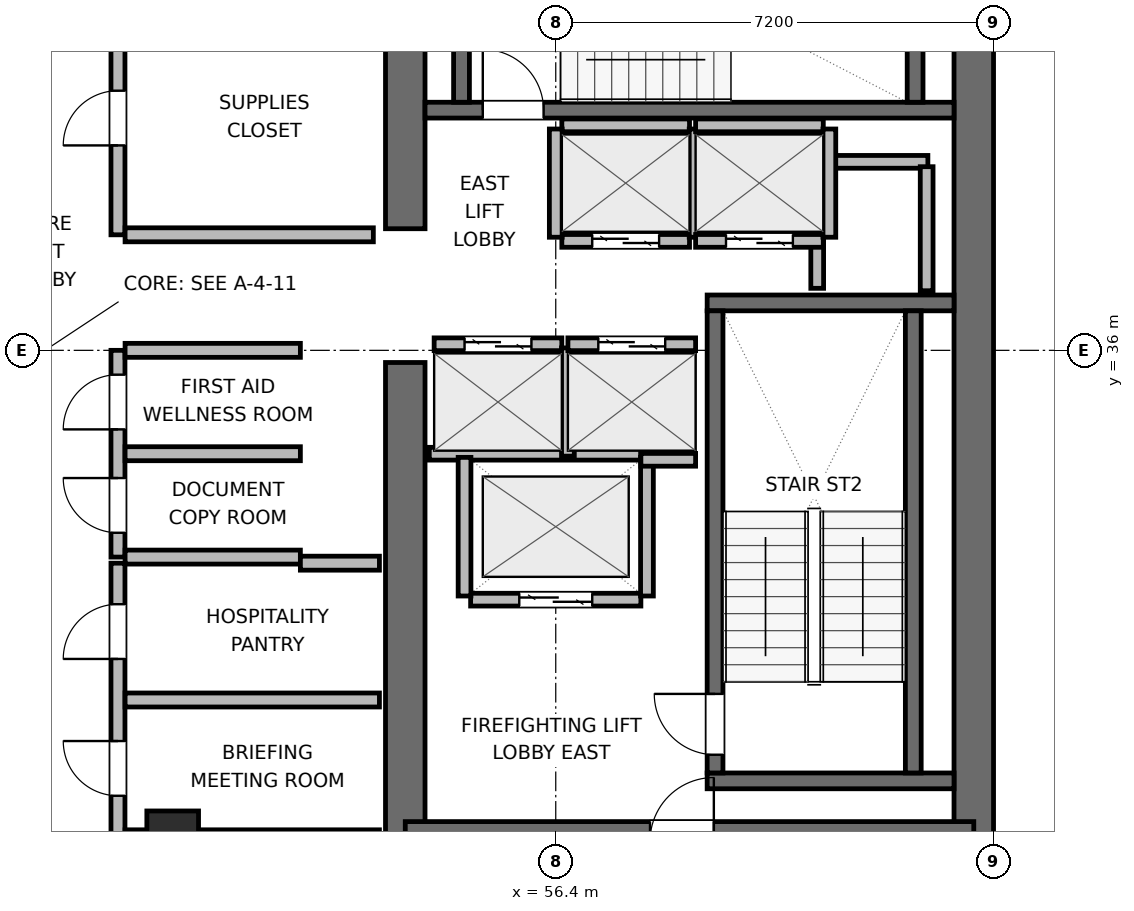
"""IFC4 building model, lengths in metres.
Left out: names, types, materials, properties, quantities, classifications, styles, units other than length and angle.
Written with IfcOpenShell. Run it as: python <this file> out.ifc"""

import sys

from ifc_helpers import new_model, si_unit, direction, frame, frame_2d, origin, origin_2d, place, context, subcontext, project, spatial, rectangle, extrude, element, fill, save


model = new_model("IFC4")
c1 = context("Model", 3, precision=1e-05, world=origin(), true_north=direction((0.0, 1.0)))
c2 = subcontext(c1, "Body", "Model", "MODEL_VIEW")
j1 = project(units=[si_unit("LENGTHUNIT", "METRE"), si_unit("PLANEANGLEUNIT", "RADIAN")], contexts=[c1])
p1 = place(None, origin())
s1 = spatial("IfcSite", under=j1, at=p1, CompositionType="ELEMENT")
p2 = place(p1, origin())
s2 = spatial("IfcBuilding", under=s1, at=p2, CompositionType="ELEMENT")
p3 = place(p2, frame((0.0, 0.0, 255.0)))
s3 = spatial("IfcBuildingStorey", under=s2, at=p3, CompositionType="ELEMENT", Elevation=255.0)
p4 = place(p3, frame((53.925, 27.925, 0.0), z_axis=(0.0, 0.0, 1.0), x_axis=(0.0, 1.0, 0.0)))
e1 = element("IfcWall", 1, at=p4, inside=s3, PredefinedType="SHEAR", context=c2, shape_type="SweptSolid", body=[
    extrude(rectangle(XDim=7.875, YDim=0.65, at=frame_2d((3.938, 0.0))), origin(), (0.0, 0.0, 1.0), 3.9),
])
p5 = place(p3, frame((53.925, 38.0, 0.0), z_axis=(0.0, 0.0, 1.0), x_axis=(0.0, 1.0, 0.0)))
e2 = element("IfcWall", 2, at=p5, inside=s3, PredefinedType="SHEAR", context=c2, shape_type="SweptSolid", body=[
    extrude(rectangle(XDim=6.075, YDim=0.65, at=frame_2d((3.038, 0.0))), origin(), (0.0, 0.0, 1.0), 3.9),
])
p6 = place(p3, frame((63.275, 27.6, 0.0), z_axis=(0.0, 0.0, 1.0), x_axis=(0.0, 1.0, 0.0)))
e3 = element("IfcWall", 3, at=p6, inside=s3, PredefinedType="SHEAR", context=c2, shape_type="SweptSolid", body=[
    extrude(rectangle(XDim=16.8, YDim=0.65, at=frame_2d((8.4, 0.0))), origin(), (0.0, 0.0, 1.0), 3.9),
])
p7 = place(p3, frame((53.925, 27.925, 0.0), z_axis=(0.0, 0.0, 1.0), x_axis=(1.0, 0.0, 0.0)))
e4 = element("IfcWall", 4, at=p7, inside=s3, PredefinedType="SHEAR", context=c2, shape_type="SweptSolid", body=[
    extrude(rectangle(XDim=9.35, YDim=0.65, at=frame_2d((4.675, 0.0))), origin(), (0.0, 0.0, 1.0), 3.9),
])
p8 = place(p7, frame((4.025, 0.0, 0.0)))
e5 = element("IfcOpeningElement", 5, at=p8, cuts=e4, PredefinedType="OPENING", context=c2, shape_type="SweptSolid", body=[
    extrude(rectangle(XDim=1.05, YDim=2.04, at=frame_2d((0.525, 1.02))), frame((0.0, 0.335, 0.0), z_axis=(0.0, -1.0, 0.0), x_axis=(1.0, 0.0, 0.0)), (0.0, 0.0, 1.0), 0.67),
])
for number, where, z_axis, x_axis in (
    (6, (58.89, 28.92, 0.0), (0.0, 0.0, 1.0), (1.0, 0.0, 0.0)),
    (7, (58.89, 36.78, 0.0), (0.0, 0.0, 1.0), (1.0, 0.0, 0.0)),
):
    element("IfcWall", number, at=place(p3, frame(where, z_axis=z_axis, x_axis=x_axis)), inside=s3, PredefinedType="SHEAR", context=c2, shape_type="SweptSolid", body=[
        extrude(rectangle(XDim=4.06, YDim=0.26, at=frame_2d((2.03, 0.0))), origin(), (0.0, 0.0, 1.0), 3.9),
    ])
p9 = place(p3, frame((59.02, 29.05, 0.0), z_axis=(0.0, 0.0, 1.0), x_axis=(0.0, 1.0, 0.0)))
e8 = element("IfcWall", 8, at=p9, inside=s3, PredefinedType="SHEAR", context=c2, shape_type="SweptSolid", body=[
    extrude(rectangle(XDim=7.6, YDim=0.26, at=frame_2d((3.8, 0.0))), origin(), (0.0, 0.0, 1.0), 3.9),
])
p10 = place(p9, frame((0.3, 0.0, 0.0)))
e9 = element("IfcOpeningElement", 9, at=p10, cuts=e8, PredefinedType="OPENING", context=c2, shape_type="SweptSolid", body=[
    extrude(rectangle(XDim=1.0, YDim=2.04, at=frame_2d((0.5, 1.02))), frame((0.0, 0.14, 0.0), z_axis=(0.0, -1.0, 0.0), x_axis=(1.0, 0.0, 0.0)), (0.0, 0.0, 1.0), 0.28),
])
p11 = place(p3, frame((62.28, 29.05, 0.0), z_axis=(0.0, 0.0, 1.0), x_axis=(0.0, 1.0, 0.0)))
e10 = element("IfcWall", 10, at=p11, inside=s3, PredefinedType="SHEAR", context=c2, shape_type="SweptSolid", body=[
    extrude(rectangle(XDim=7.6, YDim=0.26, at=frame_2d((3.8, 0.0))), origin(), (0.0, 0.0, 1.0), 3.9),
])
p12 = place(p3, frame((54.25, 39.95, 0.0), z_axis=(0.0, 0.0, 1.0), x_axis=(1.0, 0.0, 0.0)))
e11 = element("IfcWall", 11, at=p12, inside=s3, PredefinedType="SHEAR", context=c2, shape_type="SweptSolid", body=[
    extrude(rectangle(XDim=8.7, YDim=0.26, at=frame_2d((4.35, 0.0))), origin(), (0.0, 0.0, 1.0), 3.9),
])
p13 = place(p12, frame((0.95, 0.0, 0.0)))
e12 = element("IfcOpeningElement", 12, at=p13, cuts=e11, PredefinedType="OPENING", context=c2, shape_type="SweptSolid", body=[
    extrude(rectangle(XDim=1.0, YDim=2.04, at=frame_2d((0.5, 1.02))), frame((0.0, 0.14, 0.0), z_axis=(0.0, -1.0, 0.0), x_axis=(1.0, 0.0, 0.0)), (0.0, 0.0, 1.0), 0.28),
])
for number, where, z_axis, x_axis in (
    (13, (54.85, 40.08, 0.0), (0.0, 0.0, 1.0), (0.0, 1.0, 0.0)),
    (14, (62.31, 40.08, 0.0), (0.0, 0.0, 1.0), (0.0, 1.0, 0.0)),
):
    element("IfcWall", number, at=place(p3, frame(where, z_axis=z_axis, x_axis=x_axis)), inside=s3, PredefinedType="SHEAR", context=c2, shape_type="SweptSolid", body=[
        extrude(rectangle(XDim=2.94, YDim=0.26, at=frame_2d((1.47, 0.0))), origin(), (0.0, 0.0, 1.0), 3.9),
    ])
p14 = place(p3, frame((50.1, 28.0, 0.0), z_axis=(0.0, 0.0, 1.0), x_axis=(1.0, 0.0, 0.0)))
e15 = element("IfcColumn", 15, at=p14, inside=s3, PredefinedType="COLUMN", context=c2, shape_type="SweptSolid", body=[
    extrude(rectangle(XDim=0.85, YDim=0.85, at=origin_2d()), origin(), (0.0, 0.0, 1.0), 3.9),
])
p15 = place(p3, frame((60.72, 39.1, 0.0), z_axis=(0.0, 0.0, 1.0), x_axis=(1.0, 0.0, 0.0)))
e16 = element("IfcWall", 16, at=p15, inside=s3, PredefinedType="PARTITIONING", context=c2, shape_type="SweptSolid", body=[
    extrude(rectangle(XDim=1.8, YDim=0.21, at=frame_2d((0.9, 0.0))), origin(), (0.0, 0.0, 1.0), 3.68),
])
p16 = place(p3, frame((60.7, 37.02, 0.0), z_axis=(0.0, 0.0, 1.0), x_axis=(0.0, 1.0, 0.0)))
e17 = element("IfcWall", 17, at=p16, inside=s3, PredefinedType="PARTITIONING", context=c2, shape_type="SweptSolid", body=[
    extrude(rectangle(XDim=1.96, YDim=0.21, at=frame_2d((0.98, 0.0))), origin(), (0.0, 0.0, 1.0), 3.68),
])
p17 = place(p3, frame((62.5, 36.98, 0.0), z_axis=(0.0, 0.0, 1.0), x_axis=(0.0, 1.0, 0.0)))
e18 = element("IfcWall", 18, at=p17, inside=s3, PredefinedType="PARTITIONING", context=c2, shape_type="SweptSolid", body=[
    extrude(rectangle(XDim=2.04, YDim=0.21, at=frame_2d((1.02, 0.0))), origin(), (0.0, 0.0, 1.0), 3.68),
])
p18 = place(p3, frame((55.0, 31.9, 0.0), z_axis=(0.0, 0.0, 1.0), x_axis=(1.0, 0.0, 0.0)))
e19 = element("IfcWall", 19, at=p18, inside=s3, PredefinedType="PARTITIONING", context=c2, shape_type="SweptSolid", body=[
    extrude(rectangle(XDim=2.8, YDim=0.21, at=frame_2d((1.4, 0.0))), origin(), (0.0, 0.0, 1.0), 3.68),
])
p19 = place(p18, frame((0.8, 0.0, 0.0)))
e20 = element("IfcOpeningElement", 20, at=p19, cuts=e19, PredefinedType="OPENING", context=c2, shape_type="SweptSolid", body=[
    extrude(rectangle(XDim=1.2, YDim=2.04, at=frame_2d((0.6, 1.02))), frame((0.0, 0.115, 0.0), z_axis=(0.0, -1.0, 0.0), x_axis=(1.0, 0.0, 0.0)), (0.0, 0.0, 1.0), 0.23),
])
p20 = place(p3, frame((54.32, 34.3, 0.0), z_axis=(0.0, 0.0, 1.0), x_axis=(1.0, 0.0, 0.0)))
e21 = element("IfcWall", 21, at=p20, inside=s3, PredefinedType="PARTITIONING", context=c2, shape_type="SweptSolid", body=[
    extrude(rectangle(XDim=3.48, YDim=0.21, at=frame_2d((1.74, 0.0))), origin(), (0.0, 0.0, 1.0), 3.68),
])
for number, where, z_axis, x_axis in (
    (22, (54.9, 31.96, 0.0), (0.0, 0.0, 1.0), (0.0, 1.0, 0.0)),
    (23, (57.9, 31.96, 0.0), (0.0, 0.0, 1.0), (0.0, 1.0, 0.0)),
):
    element("IfcWall", number, at=place(p3, frame(where, z_axis=z_axis, x_axis=x_axis)), inside=s3, PredefinedType="PARTITIONING", context=c2, shape_type="SweptSolid", body=[
        extrude(rectangle(XDim=2.28, YDim=0.21, at=frame_2d((1.14, 0.0))), origin(), (0.0, 0.0, 1.0), 3.68),
    ])
p21 = place(p3, frame((54.4, 36.1, 0.0), z_axis=(0.0, 0.0, 1.0), x_axis=(1.0, 0.0, 0.0)))
e24 = element("IfcWall", 24, at=p21, inside=s3, PredefinedType="PARTITIONING", context=c2, shape_type="SweptSolid", body=[
    extrude(rectangle(XDim=2.1, YDim=0.21, at=frame_2d((1.05, 0.0))), origin(), (0.0, 0.0, 1.0), 3.68),
])
p22 = place(p21, frame((0.5, 0.0, 0.0)))
e25 = element("IfcOpeningElement", 25, at=p22, cuts=e24, PredefinedType="OPENING", context=c2, shape_type="SweptSolid", body=[
    extrude(rectangle(XDim=1.1, YDim=2.04, at=frame_2d((0.55, 1.02))), frame((0.0, 0.115, 0.0), z_axis=(0.0, -1.0, 0.0), x_axis=(1.0, 0.0, 0.0)), (0.0, 0.0, 1.0), 0.23),
])
p23 = place(p3, frame((56.6, 34.26, 0.0), z_axis=(0.0, 0.0, 1.0), x_axis=(0.0, 1.0, 0.0)))
e26 = element("IfcWall", 26, at=p23, inside=s3, PredefinedType="PARTITIONING", context=c2, shape_type="SweptSolid", body=[
    extrude(rectangle(XDim=1.78, YDim=0.21, at=frame_2d((0.89, 0.0))), origin(), (0.0, 0.0, 1.0), 3.68),
])
p24 = place(p3, frame((56.6, 36.1, 0.0), z_axis=(0.0, 0.0, 1.0), x_axis=(1.0, 0.0, 0.0)))
e27 = element("IfcWall", 27, at=p24, inside=s3, PredefinedType="PARTITIONING", context=c2, shape_type="SweptSolid", body=[
    extrude(rectangle(XDim=2.1, YDim=0.21, at=frame_2d((1.05, 0.0))), origin(), (0.0, 0.0, 1.0), 3.68),
])
p25 = place(p24, frame((0.5, 0.0, 0.0)))
e28 = element("IfcOpeningElement", 28, at=p25, cuts=e27, PredefinedType="OPENING", context=c2, shape_type="SweptSolid", body=[
    extrude(rectangle(XDim=1.1, YDim=2.04, at=frame_2d((0.55, 1.02))), frame((0.0, 0.115, 0.0), z_axis=(0.0, -1.0, 0.0), x_axis=(1.0, 0.0, 0.0)), (0.0, 0.0, 1.0), 0.23),
])
p26 = place(p3, frame((57.8, 34.2, 0.0), z_axis=(0.0, 0.0, 1.0), x_axis=(1.0, 0.0, 0.0)))
e29 = element("IfcWall", 29, at=p26, inside=s3, PredefinedType="PARTITIONING", context=c2, shape_type="SweptSolid", body=[
    extrude(rectangle(XDim=0.9, YDim=0.21, at=frame_2d((0.45, 0.0))), origin(), (0.0, 0.0, 1.0), 3.68),
])
p27 = place(p3, frame((56.5, 37.8, 0.0), z_axis=(0.0, 0.0, 1.0), x_axis=(1.0, 0.0, 0.0)))
e30 = element("IfcWall", 30, at=p27, inside=s3, PredefinedType="PARTITIONING", context=c2, shape_type="SweptSolid", body=[
    extrude(rectangle(XDim=2.1, YDim=0.21, at=frame_2d((1.05, 0.0))), origin(), (0.0, 0.0, 1.0), 3.68),
])
p28 = place(p27, frame((0.5, 0.0, 0.0)))
e31 = element("IfcOpeningElement", 31, at=p28, cuts=e30, PredefinedType="OPENING", context=c2, shape_type="SweptSolid", body=[
    extrude(rectangle(XDim=1.1, YDim=2.04, at=frame_2d((0.55, 1.02))), frame((0.0, 0.115, 0.0), z_axis=(0.0, -1.0, 0.0), x_axis=(1.0, 0.0, 0.0)), (0.0, 0.0, 1.0), 0.23),
])
p29 = place(p3, frame((56.5, 39.7, 0.0), z_axis=(0.0, 0.0, 1.0), x_axis=(1.0, 0.0, 0.0)))
e32 = element("IfcWall", 32, at=p29, inside=s3, PredefinedType="PARTITIONING", context=c2, shape_type="SweptSolid", body=[
    extrude(rectangle(XDim=2.1, YDim=0.21, at=frame_2d((1.05, 0.0))), origin(), (0.0, 0.0, 1.0), 3.68),
])
for number, where, z_axis, x_axis in (
    (33, (56.4, 37.86, 0.0), (0.0, 0.0, 1.0), (0.0, 1.0, 0.0)),
    (34, (58.7, 37.86, 0.0), (0.0, 0.0, 1.0), (0.0, 1.0, 0.0)),
):
    element("IfcWall", number, at=place(p3, frame(where, z_axis=z_axis, x_axis=x_axis)), inside=s3, PredefinedType="PARTITIONING", context=c2, shape_type="SweptSolid", body=[
        extrude(rectangle(XDim=1.78, YDim=0.21, at=frame_2d((0.89, 0.0))), origin(), (0.0, 0.0, 1.0), 3.68),
    ])
p30 = place(p3, frame((58.7, 37.8, 0.0), z_axis=(0.0, 0.0, 1.0), x_axis=(1.0, 0.0, 0.0)))
e35 = element("IfcWall", 35, at=p30, inside=s3, PredefinedType="PARTITIONING", context=c2, shape_type="SweptSolid", body=[
    extrude(rectangle(XDim=2.1, YDim=0.21, at=frame_2d((1.05, 0.0))), origin(), (0.0, 0.0, 1.0), 3.68),
])
p31 = place(p30, frame((0.5, 0.0, 0.0)))
e36 = element("IfcOpeningElement", 36, at=p31, cuts=e35, PredefinedType="OPENING", context=c2, shape_type="SweptSolid", body=[
    extrude(rectangle(XDim=1.1, YDim=2.04, at=frame_2d((0.55, 1.02))), frame((0.0, 0.115, 0.0), z_axis=(0.0, -1.0, 0.0), x_axis=(1.0, 0.0, 0.0)), (0.0, 0.0, 1.0), 0.23),
])
p32 = place(p3, frame((58.7, 39.7, 0.0), z_axis=(0.0, 0.0, 1.0), x_axis=(1.0, 0.0, 0.0)))
e37 = element("IfcWall", 37, at=p32, inside=s3, PredefinedType="PARTITIONING", context=c2, shape_type="SweptSolid", body=[
    extrude(rectangle(XDim=2.1, YDim=0.21, at=frame_2d((1.05, 0.0))), origin(), (0.0, 0.0, 1.0), 3.68),
])
p33 = place(p3, frame((60.9, 37.86, 0.0), z_axis=(0.0, 0.0, 1.0), x_axis=(0.0, 1.0, 0.0)))
e38 = element("IfcWall", 38, at=p33, inside=s3, PredefinedType="PARTITIONING", context=c2, shape_type="SweptSolid", body=[
    extrude(rectangle(XDim=1.78, YDim=0.21, at=frame_2d((0.89, 0.0))), origin(), (0.0, 0.0, 1.0), 3.68),
])
p34 = place(p3, frame((49.2, 32.6, 0.0), z_axis=(0.0, 0.0, 1.0), x_axis=(0.0, 1.0, 0.0)))
e39 = element("IfcWall", 39, at=p34, inside=s3, PredefinedType="PARTITIONING", context=c2, shape_type="SweptSolid", body=[
    extrude(rectangle(XDim=3.4, YDim=0.23, at=frame_2d((1.7, 0.0))), origin(), (0.0, 0.0, 1.0), 3.68),
])
p35 = place(p34, frame((0.4, 0.0, 0.0)))
e40 = element("IfcOpeningElement", 40, at=p35, cuts=e39, PredefinedType="OPENING", context=c2, shape_type="SweptSolid", body=[
    extrude(rectangle(XDim=0.9, YDim=2.02, at=frame_2d((0.45, 1.01))), frame((0.0, 0.125, 0.0), z_axis=(0.0, -1.0, 0.0), x_axis=(1.0, 0.0, 0.0)), (0.0, 0.0, 1.0), 0.25),
])
p36 = place(p34, frame((2.1, 0.0, 0.0)))
e41 = element("IfcOpeningElement", 41, at=p36, cuts=e39, PredefinedType="OPENING", context=c2, shape_type="SweptSolid", body=[
    extrude(rectangle(XDim=0.9, YDim=2.02, at=frame_2d((0.45, 1.01))), frame((0.0, 0.125, 0.0), z_axis=(0.0, -1.0, 0.0), x_axis=(1.0, 0.0, 0.0)), (0.0, 0.0, 1.0), 0.25),
])
for number, where, z_axis, x_axis in (
    (42, (49.317, 32.6, 0.0), (0.0, 0.0, 1.0), (1.0, 0.0, 0.0)),
    (43, (49.317, 36.0, 0.0), (0.0, 0.0, 1.0), (1.0, 0.0, 0.0)),
    (44, (49.317, 34.3, 0.0), (0.0, 0.0, 1.0), (1.0, 0.0, 0.0)),
):
    element("IfcWall", number, at=place(p3, frame(where, z_axis=z_axis, x_axis=x_axis)), inside=s3, PredefinedType="PARTITIONING", context=c2, shape_type="SweptSolid", body=[
        extrude(rectangle(XDim=2.883, YDim=0.23, at=frame_2d((1.441, 0.0))), origin(), (0.0, 0.0, 1.0), 3.68),
    ])
p37 = place(p3, frame((49.2, 28.0, 0.0), z_axis=(0.0, 0.0, 1.0), x_axis=(0.0, 1.0, 0.0)))
e45 = element("IfcWall", 45, at=p37, inside=s3, PredefinedType="PARTITIONING", context=c2, shape_type="SweptSolid", body=[
    extrude(rectangle(XDim=4.5, YDim=0.23, at=frame_2d((2.25, 0.0))), origin(), (0.0, 0.0, 1.0), 3.68),
])
p38 = place(p37, frame((0.675, 0.0, 0.0)))
e46 = element("IfcOpeningElement", 46, at=p38, cuts=e45, PredefinedType="OPENING", context=c2, shape_type="SweptSolid", body=[
    extrude(rectangle(XDim=0.9, YDim=2.02, at=frame_2d((0.45, 1.01))), frame((0.0, 0.125, 0.0), z_axis=(0.0, -1.0, 0.0), x_axis=(1.0, 0.0, 0.0)), (0.0, 0.0, 1.0), 0.25),
])
p39 = place(p37, frame((2.925, 0.0, 0.0)))
e47 = element("IfcOpeningElement", 47, at=p39, cuts=e45, PredefinedType="OPENING", context=c2, shape_type="SweptSolid", body=[
    extrude(rectangle(XDim=0.9, YDim=2.02, at=frame_2d((0.45, 1.01))), frame((0.0, 0.125, 0.0), z_axis=(0.0, -1.0, 0.0), x_axis=(1.0, 0.0, 0.0)), (0.0, 0.0, 1.0), 0.25),
])
p40 = place(p3, frame((49.317, 28.0, 0.0), z_axis=(0.0, 0.0, 1.0), x_axis=(1.0, 0.0, 0.0)))
e48 = element("IfcWall", 48, at=p40, inside=s3, PredefinedType="PARTITIONING", context=c2, shape_type="SweptSolid", body=[
    extrude(rectangle(XDim=4.183, YDim=0.23, at=frame_2d((2.092, 0.0))), origin(), (0.0, 0.0, 1.0), 2.765),
])
p41 = place(p3, frame((52.2, 32.5, 0.0), z_axis=(0.0, 0.0, 1.0), x_axis=(1.0, 0.0, 0.0)))
e49 = element("IfcWall", 49, at=p41, inside=s3, PredefinedType="PARTITIONING", context=c2, shape_type="SweptSolid", body=[
    extrude(rectangle(XDim=1.3, YDim=0.23, at=frame_2d((0.65, 0.0))), origin(), (0.0, 0.0, 1.0), 3.68),
])
p42 = place(p3, frame((49.317, 30.25, 0.0), z_axis=(0.0, 0.0, 1.0), x_axis=(1.0, 0.0, 0.0)))
e50 = element("IfcWall", 50, at=p42, inside=s3, PredefinedType="PARTITIONING", context=c2, shape_type="SweptSolid", body=[
    extrude(rectangle(XDim=4.183, YDim=0.23, at=frame_2d((2.092, 0.0))), origin(), (0.0, 0.0, 1.0), 3.68),
])
p43 = place(p3, frame((49.2, 37.9, 0.0), z_axis=(0.0, 0.0, 1.0), x_axis=(0.0, 1.0, 0.0)))
e51 = element("IfcWall", 51, at=p43, inside=s3, PredefinedType="PARTITIONING", context=c2, shape_type="SweptSolid", body=[
    extrude(rectangle(XDim=6.0, YDim=0.23, at=frame_2d((3.0, 0.0))), origin(), (0.0, 0.0, 1.0), 3.68),
])
p44 = place(p43, frame((1.47, 0.0, 0.0)))
e52 = element("IfcOpeningElement", 52, at=p44, cuts=e51, PredefinedType="OPENING", context=c2, shape_type="SweptSolid", body=[
    extrude(rectangle(XDim=0.9, YDim=2.02, at=frame_2d((0.45, 1.01))), frame((0.0, 0.125, 0.0), z_axis=(0.0, -1.0, 0.0), x_axis=(1.0, 0.0, 0.0)), (0.0, 0.0, 1.0), 0.25),
])
p45 = place(p43, frame((4.47, 0.0, 0.0)))
e53 = element("IfcOpeningElement", 53, at=p45, cuts=e51, PredefinedType="OPENING", context=c2, shape_type="SweptSolid", body=[
    extrude(rectangle(XDim=0.9, YDim=2.02, at=frame_2d((0.45, 1.01))), frame((0.0, 0.125, 0.0), z_axis=(0.0, -1.0, 0.0), x_axis=(1.0, 0.0, 0.0)), (0.0, 0.0, 1.0), 0.25),
])
p46 = place(p3, frame((49.317, 37.9, 0.0), z_axis=(0.0, 0.0, 1.0), x_axis=(1.0, 0.0, 0.0)))
e54 = element("IfcWall", 54, at=p46, inside=s3, PredefinedType="PARTITIONING", context=c2, shape_type="SweptSolid", body=[
    extrude(rectangle(XDim=4.083, YDim=0.23, at=frame_2d((2.042, 0.0))), origin(), (0.0, 0.0, 1.0), 3.68),
])
p47 = place(p10, origin())
e55 = element("IfcDoor", 55, at=p47, inside=s3, OperationType="SINGLE_SWING_RIGHT", PredefinedType="DOOR", context=c2, shape_type="SweptSolid", body=[
    extrude(rectangle(XDim=1.0, YDim=2.04, at=frame_2d((0.5, 1.02))), frame((0.0, 0.025, 0.0), z_axis=(0.0, -1.0, 0.0), x_axis=(1.0, 0.0, 0.0)), (0.0, 0.0, 1.0), 0.05),
])
fill(e9, e55)
p48 = place(p13, origin())
e56 = element("IfcDoor", 56, at=p48, inside=s3, OperationType="SINGLE_SWING_LEFT", PredefinedType="DOOR", context=c2, shape_type="SweptSolid", body=[
    extrude(rectangle(XDim=1.0, YDim=2.04, at=frame_2d((0.5, 1.02))), frame((0.0, 0.025, 0.0), z_axis=(0.0, -1.0, 0.0), x_axis=(1.0, 0.0, 0.0)), (0.0, 0.0, 1.0), 0.05),
])
fill(e12, e56)
p49 = place(p19, origin())
e57 = element("IfcDoor", 57, at=p49, inside=s3, OperationType="DOUBLE_DOOR_SLIDING", PredefinedType="DOOR", context=c2, shape_type="SweptSolid", body=[
    extrude(rectangle(XDim=1.2, YDim=2.04, at=frame_2d((0.6, 1.02))), frame((0.0, 0.025, 0.0), z_axis=(0.0, -1.0, 0.0), x_axis=(1.0, 0.0, 0.0)), (0.0, 0.0, 1.0), 0.05),
])
fill(e20, e57)
p50 = place(p22, origin())
e58 = element("IfcDoor", 58, at=p50, inside=s3, OperationType="DOUBLE_DOOR_SLIDING", PredefinedType="DOOR", context=c2, shape_type="SweptSolid", body=[
    extrude(rectangle(XDim=1.1, YDim=2.04, at=frame_2d((0.55, 1.02))), frame((0.0, 0.025, 0.0), z_axis=(0.0, -1.0, 0.0), x_axis=(1.0, 0.0, 0.0)), (0.0, 0.0, 1.0), 0.05),
])
fill(e25, e58)
p51 = place(p25, origin())
e59 = element("IfcDoor", 59, at=p51, inside=s3, OperationType="DOUBLE_DOOR_SLIDING", PredefinedType="DOOR", context=c2, shape_type="SweptSolid", body=[
    extrude(rectangle(XDim=1.1, YDim=2.04, at=frame_2d((0.55, 1.02))), frame((0.0, 0.025, 0.0), z_axis=(0.0, -1.0, 0.0), x_axis=(1.0, 0.0, 0.0)), (0.0, 0.0, 1.0), 0.05),
])
fill(e28, e59)
p52 = place(p28, origin())
e60 = element("IfcDoor", 60, at=p52, inside=s3, OperationType="DOUBLE_DOOR_SLIDING", PredefinedType="DOOR", context=c2, shape_type="SweptSolid", body=[
    extrude(rectangle(XDim=1.1, YDim=2.04, at=frame_2d((0.55, 1.02))), frame((0.0, 0.025, 0.0), z_axis=(0.0, -1.0, 0.0), x_axis=(1.0, 0.0, 0.0)), (0.0, 0.0, 1.0), 0.05),
])
fill(e31, e60)
p53 = place(p31, origin())
e61 = element("IfcDoor", 61, at=p53, inside=s3, OperationType="DOUBLE_DOOR_SLIDING", PredefinedType="DOOR", context=c2, shape_type="SweptSolid", body=[
    extrude(rectangle(XDim=1.1, YDim=2.04, at=frame_2d((0.55, 1.02))), frame((0.0, 0.025, 0.0), z_axis=(0.0, -1.0, 0.0), x_axis=(1.0, 0.0, 0.0)), (0.0, 0.0, 1.0), 0.05),
])
fill(e36, e61)
p54 = place(p35, origin())
e62 = element("IfcDoor", 62, at=p54, inside=s3, OperationType="SINGLE_SWING_RIGHT", PredefinedType="DOOR", context=c2, shape_type="SweptSolid", body=[
    extrude(rectangle(XDim=0.9, YDim=2.02, at=frame_2d((0.45, 1.01))), frame((0.0, 0.025, 0.0), z_axis=(0.0, -1.0, 0.0), x_axis=(1.0, 0.0, 0.0)), (0.0, 0.0, 1.0), 0.05),
])
fill(e40, e62)
p55 = place(p36, origin())
e63 = element("IfcDoor", 63, at=p55, inside=s3, OperationType="SINGLE_SWING_LEFT", PredefinedType="DOOR", context=c2, shape_type="SweptSolid", body=[
    extrude(rectangle(XDim=0.9, YDim=2.02, at=frame_2d((0.45, 1.01))), frame((0.0, 0.025, 0.0), z_axis=(0.0, -1.0, 0.0), x_axis=(1.0, 0.0, 0.0)), (0.0, 0.0, 1.0), 0.05),
])
fill(e41, e63)
p56 = place(p38, origin())
e64 = element("IfcDoor", 64, at=p56, inside=s3, OperationType="SINGLE_SWING_RIGHT", PredefinedType="DOOR", context=c2, shape_type="SweptSolid", body=[
    extrude(rectangle(XDim=0.9, YDim=2.02, at=frame_2d((0.45, 1.01))), frame((0.0, 0.025, 0.0), z_axis=(0.0, -1.0, 0.0), x_axis=(1.0, 0.0, 0.0)), (0.0, 0.0, 1.0), 0.05),
])
fill(e46, e64)
p57 = place(p39, origin())
e65 = element("IfcDoor", 65, at=p57, inside=s3, OperationType="SINGLE_SWING_LEFT", PredefinedType="DOOR", context=c2, shape_type="SweptSolid", body=[
    extrude(rectangle(XDim=0.9, YDim=2.02, at=frame_2d((0.45, 1.01))), frame((0.0, 0.025, 0.0), z_axis=(0.0, -1.0, 0.0), x_axis=(1.0, 0.0, 0.0)), (0.0, 0.0, 1.0), 0.05),
])
fill(e47, e65)
p58 = place(p44, origin())
e66 = element("IfcDoor", 66, at=p58, inside=s3, OperationType="SINGLE_SWING_LEFT", PredefinedType="DOOR", context=c2, shape_type="SweptSolid", body=[
    extrude(rectangle(XDim=0.9, YDim=2.02, at=frame_2d((0.45, 1.01))), frame((0.0, 0.025, 0.0), z_axis=(0.0, -1.0, 0.0), x_axis=(1.0, 0.0, 0.0)), (0.0, 0.0, 1.0), 0.05),
])
fill(e52, e66)
save(model, sys.argv[1])
